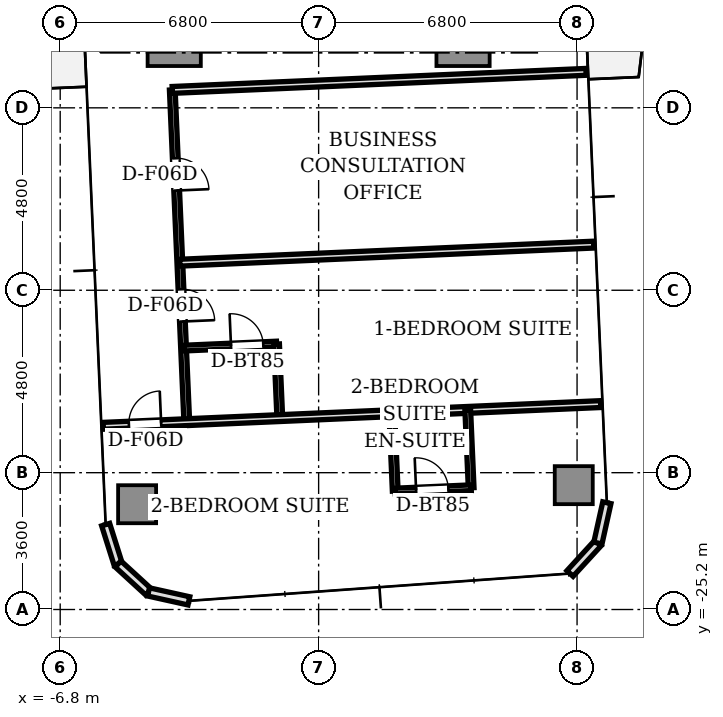
"""IFC4 building model, lengths in metres.
Left out: names, types, materials, properties, quantities, classifications, styles, units other than length and angle.
Written with IfcOpenShell. Run it as: python <this file> out.ifc"""

import sys

from ifc_helpers import new_model, si_unit, direction, frame, frame_2d, origin, origin_2d, place, context, subcontext, project, spatial, rectangle, extrude, source, transform, mapped, element, fill, save


model = new_model("IFC4")
c1 = context("Model", 3, precision=1e-05, world=origin(), true_north=direction((0.0, 1.0)))
c2 = subcontext(c1, "Body", "Model", "MODEL_VIEW")
j1 = project(units=[si_unit("LENGTHUNIT", "METRE"), si_unit("PLANEANGLEUNIT", "RADIAN")], contexts=[c1])
p1 = place(None, origin())
s1 = spatial("IfcSite", under=j1, at=p1, CompositionType="ELEMENT")
p2 = place(p1, origin())
s2 = spatial("IfcBuilding", under=s1, at=p2, CompositionType="ELEMENT")
p3 = place(p2, frame((0.0, 0.0, 111.45)))
s3 = spatial("IfcBuildingStorey", under=s2, at=p3, CompositionType="ELEMENT", Elevation=111.45)
m1 = source(origin(), c2, "Body", "SweptSolid", [
    extrude(rectangle(XDim=1.4, YDim=1.4, at=origin_2d()), origin(), (0.0, 0.0, 1.0), 3.11),
])
for number, where, z_axis, x_axis in (
    (1, (-3.8, -10.2, 0.0), (0.0, 0.0, 1.0), (1.0, 0.0, 0.0)),
    (2, (3.8, -10.2, 0.0), (0.0, 0.0, 1.0), (1.0, 0.0, 0.0)),
):
    element("IfcColumn", number, at=place(p3, frame(where, z_axis=z_axis, x_axis=x_axis)), inside=s3, PredefinedType="COLUMN", context=c2, shape_type="MappedRepresentation", body=[
        mapped(m1, transform((0.0, 0.0, 0.0), scale=1.0)),
    ])
m2 = source(origin(), c2, "Body", "SweptSolid", [
    extrude(rectangle(XDim=1.0, YDim=1.0, at=origin_2d()), origin(), (0.0, 0.0, 1.0), 3.11),
])
for number, where, z_axis, x_axis in (
    (3, (-4.776, -22.43, 0.0), (0.0, 0.0, 1.0), (1.0, 0.0, 0.0)),
    (4, (6.713, -21.928, 0.0), (0.0, 0.0, 1.0), (1.0, 0.0, 0.0)),
):
    element("IfcColumn", number, at=place(p3, frame(where, z_axis=z_axis, x_axis=x_axis)), inside=s3, PredefinedType="COLUMN", context=c2, shape_type="MappedRepresentation", body=[
        mapped(m2, transform((0.0, 0.0, 0.0), scale=1.0)),
    ])
p4 = place(p3, frame((-5.604, -22.966, 0.0), z_axis=(0.0, 0.0, 1.0), x_axis=(0.300755105707, -0.953701403161, 0.0)))
e5 = element("IfcWall", 5, at=p4, inside=s3, PredefinedType="STANDARD", context=c2, shape_type="SweptSolid", body=[
    extrude(rectangle(XDim=1.087, YDim=0.22, at=frame_2d((0.543, 0.0))), origin(), (0.0, 0.0, 1.0), 3.11),
])
p5 = place(p3, frame((-5.277, -24.003, 0.0), z_axis=(0.0, 0.0, 1.0), x_axis=(0.737312600672, -0.675551721847, 0.0)))
e6 = element("IfcWall", 6, at=p5, inside=s3, PredefinedType="STANDARD", context=c2, shape_type="SweptSolid", body=[
    extrude(rectangle(XDim=1.087, YDim=0.22, at=frame_2d((0.543, 0.0))), origin(), (0.0, 0.0, 1.0), 3.11),
])
for number, where, z_axis, x_axis in (
    (7, (-4.475, -24.737, 0.0), (0.0, 0.0, 1.0), (0.976, -0.217, 0.0)),
    (8, (6.614, -24.253, 0.0), (0.0, 0.0, 1.0), (0.676, 0.737, 0.0)),
):
    element("IfcWall", number, at=place(p3, frame(where, z_axis=z_axis, x_axis=x_axis)), inside=s3, PredefinedType="STANDARD", context=c2, shape_type="SweptSolid", body=[
        extrude(rectangle(XDim=1.087, YDim=0.22, at=frame_2d((0.543, 0.0))), origin(), (0.0, 0.0, 1.0), 3.11),
    ])
p6 = place(p3, frame((7.349, -23.452, 0.0), z_axis=(0.0, 0.0, 1.0), x_axis=(0.216454939174, 0.976292609471, 0.0)))
e9 = element("IfcWall", 9, at=p6, inside=s3, PredefinedType="STANDARD", context=c2, shape_type="SweptSolid", body=[
    extrude(rectangle(XDim=1.087, YDim=0.22, at=frame_2d((0.544, 0.0))), origin(), (0.0, 0.0, 1.0), 3.11),
])
p7 = place(p3, frame((-3.851, -11.529, 0.0), z_axis=(0.0, 0.0, 1.0), x_axis=(0.043638220751, -0.999047399121, 0.0)))
e10 = element("IfcWall", 10, at=p7, inside=s3, PredefinedType="PARTITIONING", context=c2, shape_type="SweptSolid", body=[
    extrude(rectangle(XDim=8.75, YDim=0.15, at=frame_2d((4.375, 0.0))), origin(), (0.0, 0.0, 1.0), 2.63),
])
p8 = place(p7, frame((1.8, 0.0, 0.0)))
e11 = element("IfcOpeningElement", 11, at=p8, cuts=e10, PredefinedType="OPENING", context=c2, shape_type="SweptSolid", body=[
    extrude(rectangle(XDim=0.85, YDim=2.1, at=frame_2d((0.425, 1.05))), frame((0.0, 0.085, 0.0), z_axis=(0.0, -1.0, 0.0), x_axis=(1.0, 0.0, 0.0)), (0.0, 0.0, 1.0), 0.17),
])
p9 = place(p7, frame((5.25, 0.0, 0.0)))
e12 = element("IfcOpeningElement", 12, at=p9, cuts=e10, PredefinedType="OPENING", context=c2, shape_type="SweptSolid", body=[
    extrude(rectangle(XDim=0.85, YDim=2.1, at=frame_2d((0.425, 1.05))), frame((0.0, 0.085, 0.0), z_axis=(0.0, -1.0, 0.0), x_axis=(1.0, 0.0, 0.0)), (0.0, 0.0, 1.0), 0.17),
])
p10 = place(p3, frame((-3.851, -11.529, 0.0), z_axis=(0.0, 0.0, 1.0), x_axis=(0.999048663393, 0.043609267053, 0.0)))
e13 = element("IfcWall", 13, at=p10, inside=s3, PredefinedType="PARTITIONING", context=c2, shape_type="SweptSolid", body=[
    extrude(rectangle(XDim=10.9, YDim=0.18, at=frame_2d((5.45, 0.0))), origin(), (0.0, 0.0, 1.0), 2.66),
])
p11 = place(p3, frame((-3.652, -16.075, 0.0), z_axis=(0.0, 0.0, 1.0), x_axis=(0.999047687305, 0.043631622609, 0.0)))
e14 = element("IfcWall", 14, at=p11, inside=s3, PredefinedType="PARTITIONING", context=c2, shape_type="SweptSolid", body=[
    extrude(rectangle(XDim=10.9, YDim=0.18, at=frame_2d((5.45, 0.0))), origin(), (0.0, 0.0, 1.0), 2.66),
])
p12 = place(p3, frame((-3.554, -18.323, 0.0), z_axis=(0.0, 0.0, 1.0), x_axis=(0.999047112283, 0.043644787072, 0.0)))
e15 = element("IfcWall", 15, at=p12, inside=s3, PredefinedType="PARTITIONING", context=c2, shape_type="SweptSolid", body=[
    extrude(rectangle(XDim=2.45, YDim=0.15, at=frame_2d((1.225, 0.0))), origin(), (0.0, 0.0, 1.0), 2.66),
])
p13 = place(p12, frame((1.25, 0.0, 0.0)))
e16 = element("IfcOpeningElement", 16, at=p13, cuts=e15, PredefinedType="OPENING", context=c2, shape_type="SweptSolid", body=[
    extrude(rectangle(XDim=0.85, YDim=2.1, at=frame_2d((0.425, 1.05))), frame((0.0, 0.085, 0.0), z_axis=(0.0, -1.0, 0.0), x_axis=(1.0, 0.0, 0.0)), (0.0, 0.0, 1.0), 0.17),
])
p14 = place(p3, frame((-1.106, -18.216, 0.0), z_axis=(0.0, 0.0, 1.0), x_axis=(0.043567614947, -0.99905048067, 0.0)))
e17 = element("IfcWall", 17, at=p14, inside=s3, PredefinedType="PARTITIONING", context=c2, shape_type="SweptSolid", body=[
    extrude(rectangle(XDim=1.95, YDim=0.15, at=frame_2d((0.975, 0.0))), origin(), (0.0, 0.0, 1.0), 2.66),
])
p15 = place(p3, frame((-5.667, -20.367, 0.0), z_axis=(0.0, 0.0, 1.0), x_axis=(0.999047806124, 0.043628901879, 0.0)))
e18 = element("IfcWall", 18, at=p15, inside=s3, PredefinedType="PARTITIONING", context=c2, shape_type="SweptSolid", body=[
    extrude(rectangle(XDim=13.1, YDim=0.18, at=frame_2d((6.55, 0.0))), origin(), (0.0, 0.0, 1.0), 2.66),
])
p16 = place(p15, frame((0.675, 0.0, 0.0)))
e19 = element("IfcOpeningElement", 19, at=p16, cuts=e18, PredefinedType="OPENING", context=c2, shape_type="SweptSolid", body=[
    extrude(rectangle(XDim=0.85, YDim=2.1, at=frame_2d((0.425, 1.05))), frame((0.0, 0.1, 0.0), z_axis=(0.0, -1.0, 0.0), x_axis=(1.0, 0.0, 0.0)), (0.0, 0.0, 1.0), 0.2),
])
p17 = place(p3, frame((3.924, -19.948, 0.0), z_axis=(0.0, 0.0, 1.0), x_axis=(0.043587097972, -0.999049630844, 0.0)))
e20 = element("IfcWall", 20, at=p17, inside=s3, PredefinedType="PARTITIONING", context=c2, shape_type="SweptSolid", body=[
    extrude(rectangle(XDim=2.05, YDim=0.15, at=frame_2d((1.025, 0.0))), origin(), (0.0, 0.0, 1.0), 2.66),
])
p18 = place(p3, frame((1.926, -20.035, 0.0), z_axis=(0.0, 0.0, 1.0), x_axis=(0.043592284462, -0.999049404552, 0.0)))
e21 = element("IfcWall", 21, at=p18, inside=s3, PredefinedType="PARTITIONING", context=c2, shape_type="SweptSolid", body=[
    extrude(rectangle(XDim=2.05, YDim=0.15, at=frame_2d((1.025, 0.0))), origin(), (0.0, 0.0, 1.0), 2.66),
])
p19 = place(p3, frame((2.015, -22.083, 0.0), z_axis=(0.0, 0.0, 1.0), x_axis=(0.999049929275, 0.043580257179, 0.0)))
e22 = element("IfcWall", 22, at=p19, inside=s3, PredefinedType="PARTITIONING", context=c2, shape_type="SweptSolid", body=[
    extrude(rectangle(XDim=2.0, YDim=0.15, at=frame_2d((1.0, 0.0))), origin(), (0.0, 0.0, 1.0), 2.58),
])
p20 = place(p19, frame((0.55, 0.0, 0.0)))
e23 = element("IfcOpeningElement", 23, at=p20, cuts=e22, PredefinedType="OPENING", context=c2, shape_type="SweptSolid", body=[
    extrude(rectangle(XDim=0.85, YDim=2.1, at=frame_2d((0.425, 1.05))), frame((0.0, 0.085, 0.0), z_axis=(0.0, -1.0, 0.0), x_axis=(1.0, 0.0, 0.0)), (0.0, 0.0, 1.0), 0.17),
])
m3 = source(origin(), c2, "Body", "SweptSolid", [
    extrude(rectangle(XDim=0.85, YDim=0.05, at=origin_2d()), origin(), (0.0, 0.0, 1.0), 2.1),
])
p21 = place(p8, frame((0.425, 0.0, 0.0)))
e24 = element("IfcDoor", 24, at=p21, inside=s3, OperationType="SINGLE_SWING_RIGHT", PredefinedType="DOOR", context=c2, shape_type="MappedRepresentation", body=[
    mapped(m3, transform((0.0, 0.0, 0.0), scale=1.0)),
])
fill(e11, e24)
p22 = place(p13, frame((0.425, 0.0, 0.0)))
e25 = element("IfcDoor", 25, at=p22, inside=s3, OperationType="SINGLE_SWING_LEFT", PredefinedType="DOOR", context=c2, shape_type="MappedRepresentation", body=[
    mapped(m3, transform((0.0, 0.0, 0.0), scale=1.0)),
])
fill(e16, e25)
p23 = place(p9, frame((0.425, 0.0, 0.0)))
e26 = element("IfcDoor", 26, at=p23, inside=s3, OperationType="SINGLE_SWING_RIGHT", PredefinedType="DOOR", context=c2, shape_type="MappedRepresentation", body=[
    mapped(m3, transform((0.0, 0.0, 0.0), scale=1.0)),
])
fill(e12, e26)
p24 = place(p20, frame((0.425, 0.0, 0.0)))
e27 = element("IfcDoor", 27, at=p24, inside=s3, OperationType="SINGLE_SWING_LEFT", PredefinedType="DOOR", context=c2, shape_type="MappedRepresentation", body=[
    mapped(m3, transform((0.0, 0.0, 0.0), scale=1.0)),
])
fill(e23, e27)
p25 = place(p16, frame((0.425, 0.0, 0.0)))
e28 = element("IfcDoor", 28, at=p25, inside=s3, OperationType="SINGLE_SWING_RIGHT", PredefinedType="DOOR", context=c2, shape_type="MappedRepresentation", body=[
    mapped(m3, transform((0.0, 0.0, 0.0), scale=1.0)),
])
fill(e19, e28)
save(model, sys.argv[1])
